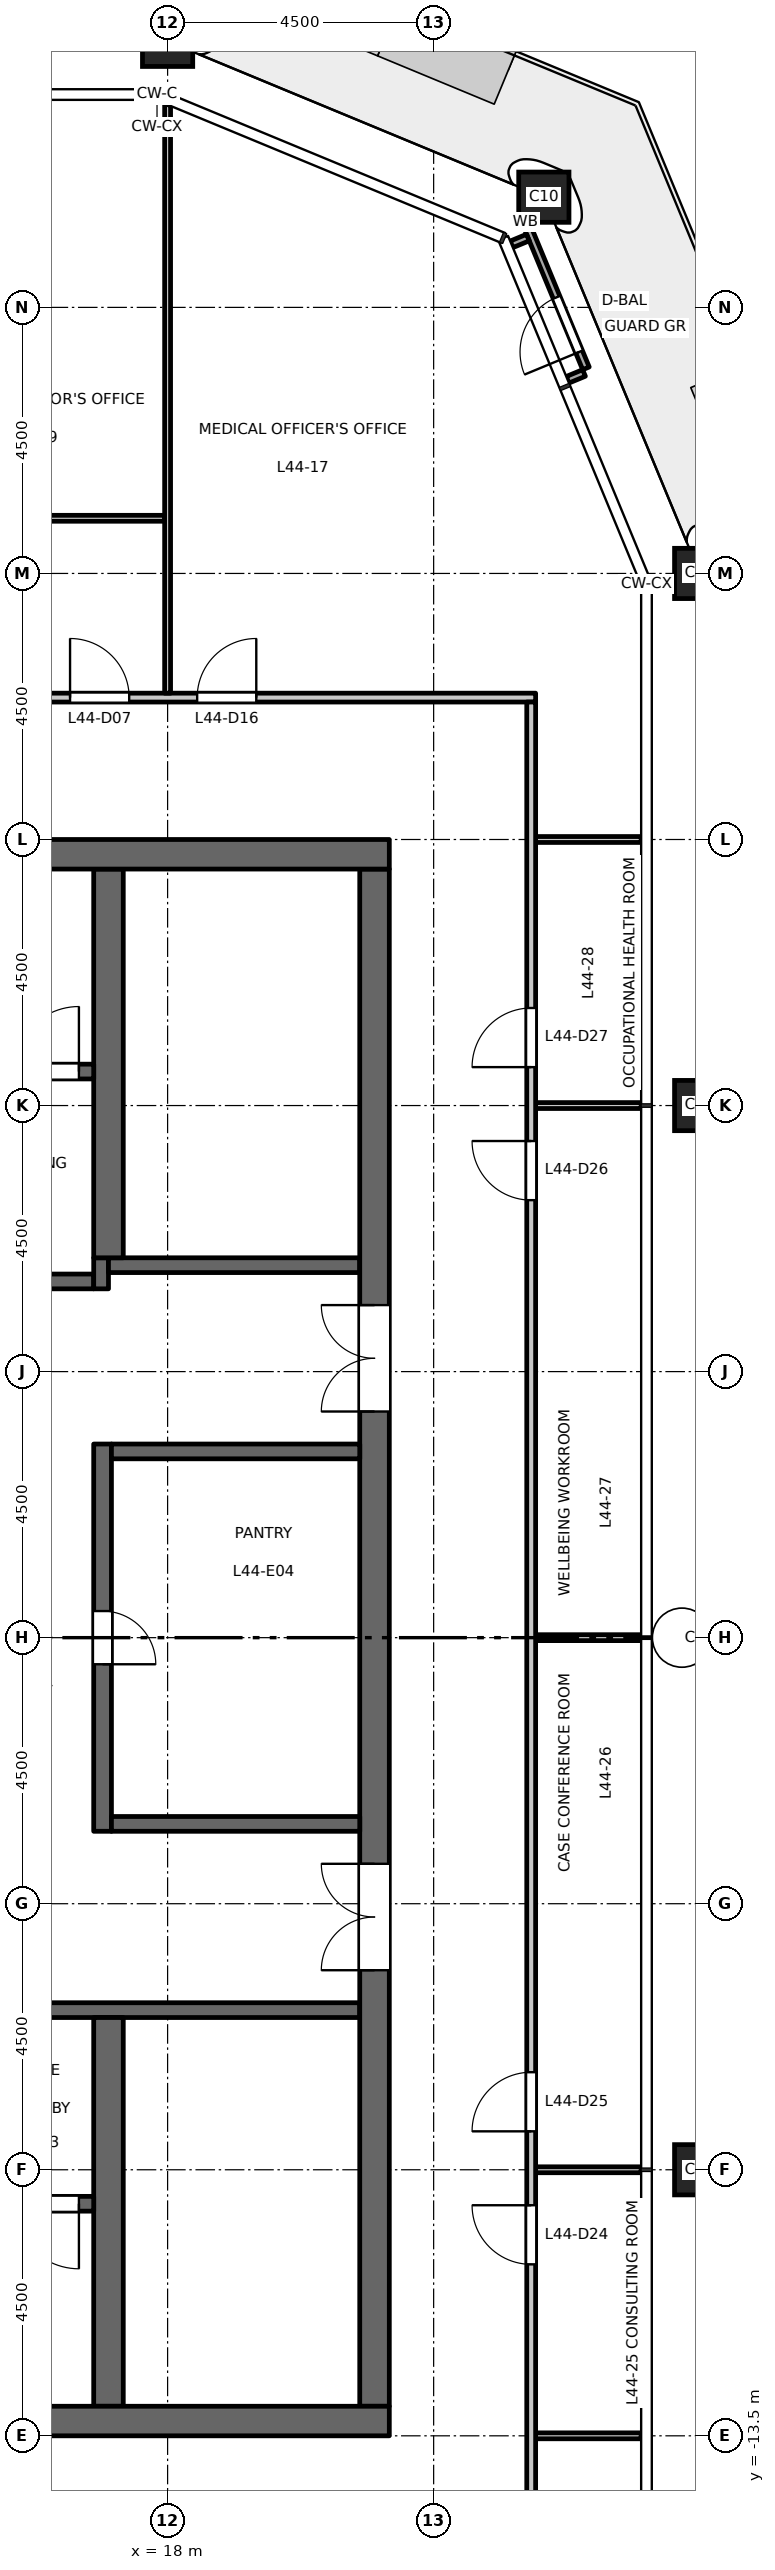
"""IFC4 building model, lengths in metres.
Left out: names, types, materials, properties, quantities, classifications, styles, units other than length and angle.
Written with IfcOpenShell. Run it as: python <this file> out.ifc"""

import sys

from ifc_helpers import new_model, si_unit, direction, frame, frame_2d, origin, origin_2d, place, context, subcontext, project, spatial, rectangle, hollow_rectangle, extrude, element, fill, save


model = new_model("IFC4")
c1 = context("Model", 3, precision=1e-05, world=origin(), true_north=direction((0.0, 1.0)))
c2 = subcontext(c1, "Body", "Model", "MODEL_VIEW")
j1 = project(units=[si_unit("LENGTHUNIT", "METRE"), si_unit("PLANEANGLEUNIT", "RADIAN")], contexts=[c1])
p1 = place(None, origin())
s1 = spatial("IfcSite", under=j1, at=p1, CompositionType="ELEMENT")
p2 = place(p1, origin())
s2 = spatial("IfcBuilding", under=s1, at=p2, CompositionType="ELEMENT")
p3 = place(p2, frame((0.0, 0.0, 206.2)))
s3 = spatial("IfcBuildingStorey", under=s2, at=p3, CompositionType="ELEMENT", Elevation=206.2)
for number, where, z_axis, x_axis in (
    (1, (27.0, -9.0, 0.0), (0.0, 0.0, 1.0), (1.0, 0.0, 0.0)),
    (2, (27.0, 0.0, 0.0), (0.0, 0.0, 1.0), (1.0, 0.0, 0.0)),
    (3, (27.0, 9.0, 0.0), (0.0, 0.0, 1.0), (1.0, 0.0, 0.0)),
    (4, (27.0, 18.0, 0.0), (0.0, 0.0, 1.0), (1.0, 0.0, 0.0)),
    (5, (24.364, 24.364, 0.0), (0.0, 0.0, 1.0), (1.0, 0.0, 0.0)),
    (6, (18.0, 27.0, 0.0), (0.0, 0.0, 1.0), (1.0, 0.0, 0.0)),
):
    element("IfcColumn", number, at=place(p3, frame(where, z_axis=z_axis, x_axis=x_axis)), inside=s3, PredefinedType="COLUMN", context=c2, shape_type="SweptSolid", body=[
        extrude(hollow_rectangle(XDim=0.85, YDim=0.85, WallThickness=0.05, at=origin_2d()), origin(), (0.0, 0.0, 1.0), 4.5),
    ])
p4 = place(p3, frame((12.15, 6.025, 0.0), z_axis=(0.0, 0.0, 1.0), x_axis=(1.0, 0.0, 0.0)))
e7 = element("IfcWall", 7, at=p4, inside=s3, PredefinedType="SHEAR", context=c2, shape_type="SweptSolid", body=[
    extrude(rectangle(XDim=4.6, YDim=0.25, at=frame_2d((2.3, 0.0))), origin(), (0.0, 0.0, 1.0), 4.35),
])
p5 = place(p4, frame((1.8, 0.0, 0.0)))
e8 = element("IfcOpeningElement", 8, at=p5, cuts=e7, PredefinedType="OPENING", context=c2, shape_type="SweptSolid", body=[
    extrude(rectangle(XDim=1.0, YDim=2.1, at=frame_2d((0.5, 1.05))), frame((0.0, 0.135, 0.0), z_axis=(0.0, -1.0, 0.0), x_axis=(1.0, 0.0, 0.0)), (0.0, 0.0, 1.0), 0.27),
])
p6 = place(p3, frame((16.875, 5.9, 0.0), z_axis=(0.0, 0.0, 1.0), x_axis=(0.0, 1.0, 0.0)))
e9 = element("IfcWall", 9, at=p6, inside=s3, PredefinedType="SHEAR", context=c2, shape_type="SweptSolid", body=[
    extrude(rectangle(XDim=0.525, YDim=0.25, at=frame_2d((0.263, 0.0))), origin(), (0.0, 0.0, 1.0), 4.35),
])
p7 = place(p3, frame((17.0, 6.3, 0.0), z_axis=(0.0, 0.0, 1.0), x_axis=(1.0, 0.0, 0.0)))
e10 = element("IfcWall", 10, at=p7, inside=s3, PredefinedType="SHEAR", context=c2, shape_type="SweptSolid", body=[
    extrude(rectangle(XDim=4.25, YDim=0.25, at=frame_2d((2.125, 0.0))), origin(), (0.0, 0.0, 1.0), 4.35),
])
p8 = place(p3, frame((12.15, -6.3, 0.0), z_axis=(0.0, 0.0, 1.0), x_axis=(1.0, 0.0, 0.0)))
e11 = element("IfcWall", 11, at=p8, inside=s3, PredefinedType="SHEAR", context=c2, shape_type="SweptSolid", body=[
    extrude(rectangle(XDim=9.1, YDim=0.25, at=frame_2d((4.55, 0.0))), origin(), (0.0, 0.0, 1.0), 4.35),
])
p9 = place(p8, frame((1.8, 0.0, 0.0)))
e12 = element("IfcOpeningElement", 12, at=p9, cuts=e11, PredefinedType="OPENING", context=c2, shape_type="SweptSolid", body=[
    extrude(rectangle(XDim=1.0, YDim=2.1, at=frame_2d((0.5, 1.05))), frame((0.0, 0.135, 0.0), z_axis=(0.0, -1.0, 0.0), x_axis=(1.0, 0.0, 0.0)), (0.0, 0.0, 1.0), 0.27),
])
p10 = place(p3, frame((21.5, -13.0, 0.0), z_axis=(0.0, 0.0, 1.0), x_axis=(0.0, 1.0, 0.0)))
e13 = element("IfcWall", 13, at=p10, inside=s3, PredefinedType="SHEAR", context=c2, shape_type="SweptSolid", body=[
    extrude(rectangle(XDim=26.0, YDim=0.5, at=frame_2d((13.0, 0.0))), origin(), (0.0, 0.0, 1.0), 4.35),
])
p11 = place(p10, frame((16.825, 0.0, 0.0)))
e14 = element("IfcOpeningElement", 14, at=p11, cuts=e13, PredefinedType="OPENING", context=c2, shape_type="SweptSolid", body=[
    extrude(rectangle(XDim=1.8, YDim=2.1, at=frame_2d((0.9, 1.05))), frame((0.0, 0.26, 0.0), z_axis=(0.0, -1.0, 0.0), x_axis=(1.0, 0.0, 0.0)), (0.0, 0.0, 1.0), 0.52),
])
p12 = place(p10, frame((7.375, 0.0, 0.0)))
e15 = element("IfcOpeningElement", 15, at=p12, cuts=e13, PredefinedType="OPENING", context=c2, shape_type="SweptSolid", body=[
    extrude(rectangle(XDim=1.8, YDim=2.1, at=frame_2d((0.9, 1.05))), frame((0.0, 0.26, 0.0), z_axis=(0.0, -1.0, 0.0), x_axis=(1.0, 0.0, 0.0)), (0.0, 0.0, 1.0), 0.52),
])
p13 = place(p3, frame((16.9, -3.275, 0.0), z_axis=(0.0, 0.0, 1.0), x_axis=(0.0, 1.0, 0.0)))
e16 = element("IfcWall", 16, at=p13, inside=s3, PredefinedType="SHEAR", context=c2, shape_type="SweptSolid", body=[
    extrude(rectangle(XDim=6.55, YDim=0.3, at=frame_2d((3.275, 0.0))), origin(), (0.0, 0.0, 1.0), 4.35),
])
p14 = place(p13, frame((2.825, 0.0, 0.0)))
e17 = element("IfcOpeningElement", 17, at=p14, cuts=e16, PredefinedType="OPENING", context=c2, shape_type="SweptSolid", body=[
    extrude(rectangle(XDim=0.9, YDim=2.1, at=frame_2d((0.45, 1.05))), frame((0.0, 0.16, 0.0), z_axis=(0.0, -1.0, 0.0), x_axis=(1.0, 0.0, 0.0)), (0.0, 0.0, 1.0), 0.32),
])
for number, where, z_axis, x_axis in (
    (18, (17.05, 3.15, 0.0), (0.0, 0.0, 1.0), (1.0, 0.0, 0.0)),
    (19, (17.05, -3.15, 0.0), (0.0, 0.0, 1.0), (1.0, 0.0, 0.0)),
):
    element("IfcWall", number, at=place(p3, frame(where, z_axis=z_axis, x_axis=x_axis)), inside=s3, PredefinedType="SHEAR", context=c2, shape_type="SweptSolid", body=[
        extrude(rectangle(XDim=4.2, YDim=0.25, at=frame_2d((2.1, 0.0))), origin(), (0.0, 0.0, 1.0), 4.35),
    ])
for number, where, z_axis, x_axis in (
    (20, (17.0, 6.425, 0.0), (0.0, 0.0, 1.0), (0.0, 1.0, 0.0)),
    (21, (17.0, -13.0, 0.0), (0.0, 0.0, 1.0), (0.0, 1.0, 0.0)),
):
    element("IfcWall", number, at=place(p3, frame(where, z_axis=z_axis, x_axis=x_axis)), inside=s3, PredefinedType="SHEAR", context=c2, shape_type="SweptSolid", body=[
        extrude(rectangle(XDim=6.575, YDim=0.5, at=frame_2d((3.288, 0.0))), origin(), (0.0, 0.0, 1.0), 4.35),
    ])
p15 = place(p3, frame((8.75, 9.575, 0.0), z_axis=(0.0, 0.0, 1.0), x_axis=(1.0, 0.0, 0.0)))
e22 = element("IfcWall", 22, at=p15, inside=s3, PredefinedType="SHEAR", context=c2, shape_type="SweptSolid", body=[
    extrude(rectangle(XDim=8.0, YDim=0.25, at=frame_2d((4.0, 0.0))), origin(), (0.0, 0.0, 1.0), 4.35),
])
p16 = place(p15, frame((6.65, 0.0, 0.0)))
e23 = element("IfcOpeningElement", 23, at=p16, cuts=e22, PredefinedType="OPENING", context=c2, shape_type="SweptSolid", body=[
    extrude(rectangle(XDim=1.1, YDim=2.1, at=frame_2d((0.55, 1.05))), frame((0.0, 0.135, 0.0), z_axis=(0.0, -1.0, 0.0), x_axis=(1.0, 0.0, 0.0)), (0.0, 0.0, 1.0), 0.27),
])
p17 = place(p3, frame((8.75, -9.575, 0.0), z_axis=(0.0, 0.0, 1.0), x_axis=(1.0, 0.0, 0.0)))
e24 = element("IfcWall", 24, at=p17, inside=s3, PredefinedType="SHEAR", context=c2, shape_type="SweptSolid", body=[
    extrude(rectangle(XDim=8.0, YDim=0.25, at=frame_2d((4.0, 0.0))), origin(), (0.0, 0.0, 1.0), 4.35),
])
p18 = place(p17, frame((6.65, 0.0, 0.0)))
e25 = element("IfcOpeningElement", 25, at=p18, cuts=e24, PredefinedType="OPENING", context=c2, shape_type="SweptSolid", body=[
    extrude(rectangle(XDim=1.1, YDim=2.1, at=frame_2d((0.55, 1.05))), frame((0.0, 0.135, 0.0), z_axis=(0.0, -1.0, 0.0), x_axis=(1.0, 0.0, 0.0)), (0.0, 0.0, 1.0), 0.27),
])
for number, where, z_axis, x_axis in (
    (26, (8.25, 13.25, 0.0), (0.0, 0.0, 1.0), (1.0, 0.0, 0.0)),
    (27, (8.25, -13.25, 0.0), (0.0, 0.0, 1.0), (1.0, 0.0, 0.0)),
):
    element("IfcWall", number, at=place(p3, frame(where, z_axis=z_axis, x_axis=x_axis)), inside=s3, PredefinedType="SHEAR", context=c2, shape_type="SweptSolid", body=[
        extrude(rectangle(XDim=13.5, YDim=0.5, at=frame_2d((6.75, 0.0))), origin(), (0.0, 0.0, 1.0), 4.35),
    ])
p19 = place(p3, frame((24.766, 21.276, 0.0), z_axis=(0.0, 0.0, 1.0), x_axis=(0.923917630863, 0.382591441855, 0.0)))
e28 = element("IfcWall", 28, at=p19, inside=s3, PredefinedType="STANDARD", context=c2, shape_type="SweptSolid", body=[
    extrude(rectangle(XDim=0.3, YDim=0.12, at=frame_2d((0.15, 0.0))), origin(), (0.0, 0.0, 1.0), 4.35),
])
p20 = place(p3, frame((23.818, 23.566, 0.0), z_axis=(0.0, 0.0, 1.0), x_axis=(0.923629715641, 0.383285987724, 0.0)))
e29 = element("IfcWall", 29, at=p20, inside=s3, PredefinedType="STANDARD", context=c2, shape_type="SweptSolid", body=[
    extrude(rectangle(XDim=0.3, YDim=0.12, at=frame_2d((0.15, 0.0))), origin(), (0.0, 0.0, 1.0), 4.35),
])
p21 = place(p3, frame((25.076, 21.469, 0.0), z_axis=(0.0, 0.0, 1.0), x_axis=(-0.382636771556, 0.923898858671, 0.0)))
e30 = element("IfcWall", 30, at=p21, inside=s3, PredefinedType="STANDARD", context=c2, shape_type="SweptSolid", body=[
    extrude(rectangle(XDim=2.673, YDim=0.12, at=frame_2d((1.337, 0.0))), origin(), (0.0, 0.0, 1.0), 4.35),
])
p22 = place(p21, frame((0.3, 0.0, 0.0)))
e31 = element("IfcOpeningElement", 31, at=p22, cuts=e30, PredefinedType="OPENING", context=c2, shape_type="SweptSolid", body=[
    extrude(rectangle(XDim=1.0, YDim=2.4, at=frame_2d((0.5, 1.2))), frame((0.0, 0.07, 0.0), z_axis=(0.0, -1.0, 0.0), x_axis=(1.0, 0.0, 0.0)), (0.0, 0.0, 1.0), 0.14),
])
p23 = place(p3, frame((24.225, -13.5, 0.0), z_axis=(0.0, 0.0, 1.0), x_axis=(1.0, 0.0, 0.0)))
e32 = element("IfcWall", 32, at=p23, inside=s3, PredefinedType="PARTITIONING", context=c2, shape_type="SweptSolid", body=[
    extrude(rectangle(XDim=1.785, YDim=0.1, at=frame_2d((0.893, 0.0))), origin(), (0.0, 0.0, 1.0), 3.95),
])
for number, where, z_axis, x_axis in (
    (33, (24.225, -9.0, 0.0), (0.0, 0.0, 1.0), (1.0, 0.0, 0.0)),
    (34, (24.225, 0.0, 0.0), (0.0, 0.0, 1.0), (1.0, 0.0, 0.0)),
    (35, (24.225, 9.0, 0.0), (0.0, 0.0, 1.0), (1.0, 0.0, 0.0)),
    (36, (24.225, 13.5, 0.0), (0.0, 0.0, 1.0), (1.0, 0.0, 0.0)),
):
    element("IfcWall", number, at=place(p3, frame(where, z_axis=z_axis, x_axis=x_axis)), inside=s3, PredefinedType="PARTITIONING", context=c2, shape_type="SweptSolid", body=[
        extrude(rectangle(XDim=1.785, YDim=0.1, at=frame_2d((0.893, 0.0))), origin(), (0.0, 0.0, 1.0), 4.35),
    ])
p24 = place(p3, frame((-24.225, 15.9, 0.0), z_axis=(0.0, 0.0, 1.0), x_axis=(1.0, 0.0, 0.0)))
e37 = element("IfcWall", 37, at=p24, inside=s3, PredefinedType="PARTITIONING", context=c2, shape_type="SweptSolid", body=[
    extrude(rectangle(XDim=48.45, YDim=0.15, at=frame_2d((24.225, 0.0))), origin(), (0.0, 0.0, 1.0), 4.35),
])
p25 = place(p24, frame((13.575, 0.0, 0.0)))
e38 = element("IfcOpeningElement", 38, at=p25, cuts=e37, PredefinedType="OPENING", context=c2, shape_type="SweptSolid", body=[
    extrude(rectangle(XDim=1.0, YDim=2.1, at=frame_2d((0.5, 1.05))), frame((0.0, 0.085, 0.0), z_axis=(0.0, -1.0, 0.0), x_axis=(1.0, 0.0, 0.0)), (0.0, 0.0, 1.0), 0.17),
])
p26 = place(p24, frame((15.825, 0.0, 0.0)))
e39 = element("IfcOpeningElement", 39, at=p26, cuts=e37, PredefinedType="OPENING", context=c2, shape_type="SweptSolid", body=[
    extrude(rectangle(XDim=1.0, YDim=2.1, at=frame_2d((0.5, 1.05))), frame((0.0, 0.085, 0.0), z_axis=(0.0, -1.0, 0.0), x_axis=(1.0, 0.0, 0.0)), (0.0, 0.0, 1.0), 0.17),
])
p27 = place(p24, frame((31.575, 0.0, 0.0)))
e40 = element("IfcOpeningElement", 40, at=p27, cuts=e37, PredefinedType="OPENING", context=c2, shape_type="SweptSolid", body=[
    extrude(rectangle(XDim=1.0, YDim=2.1, at=frame_2d((0.5, 1.05))), frame((0.0, 0.085, 0.0), z_axis=(0.0, -1.0, 0.0), x_axis=(1.0, 0.0, 0.0)), (0.0, 0.0, 1.0), 0.17),
])
p28 = place(p24, frame((40.575, 0.0, 0.0)))
e41 = element("IfcOpeningElement", 41, at=p28, cuts=e37, PredefinedType="OPENING", context=c2, shape_type="SweptSolid", body=[
    extrude(rectangle(XDim=1.0, YDim=2.1, at=frame_2d((0.5, 1.05))), frame((0.0, 0.085, 0.0), z_axis=(0.0, -1.0, 0.0), x_axis=(1.0, 0.0, 0.0)), (0.0, 0.0, 1.0), 0.17),
])
p29 = place(p24, frame((4.575, 0.0, 0.0)))
e42 = element("IfcOpeningElement", 42, at=p29, cuts=e37, PredefinedType="OPENING", context=c2, shape_type="SweptSolid", body=[
    extrude(rectangle(XDim=1.0, YDim=2.1, at=frame_2d((0.5, 1.05))), frame((0.0, 0.085, 0.0), z_axis=(0.0, -1.0, 0.0), x_axis=(1.0, 0.0, 0.0)), (0.0, 0.0, 1.0), 0.17),
])
p30 = place(p24, frame((42.725, 0.0, 0.0)))
e43 = element("IfcOpeningElement", 43, at=p30, cuts=e37, PredefinedType="OPENING", context=c2, shape_type="SweptSolid", body=[
    extrude(rectangle(XDim=1.0, YDim=2.1, at=frame_2d((0.5, 1.05))), frame((0.0, 0.085, 0.0), z_axis=(0.0, -1.0, 0.0), x_axis=(1.0, 0.0, 0.0)), (0.0, 0.0, 1.0), 0.17),
])
p31 = place(p3, frame((9.05, 18.933, 0.0), z_axis=(0.0, 0.0, 1.0), x_axis=(1.0, 0.0, 0.0)))
e44 = element("IfcWall", 44, at=p31, inside=s3, PredefinedType="PARTITIONING", context=c2, shape_type="SweptSolid", body=[
    extrude(rectangle(XDim=8.9, YDim=0.1, at=frame_2d((4.45, 0.0))), origin(), (0.0, 0.0, 1.0), 4.35),
])
p32 = place(p31, frame((0.55, 0.0, 0.0)))
e45 = element("IfcOpeningElement", 45, at=p32, cuts=e44, PredefinedType="OPENING", context=c2, shape_type="SweptSolid", body=[
    extrude(rectangle(XDim=1.0, YDim=2.1, at=frame_2d((0.5, 1.05))), frame((0.0, 0.06, 0.0), z_axis=(0.0, -1.0, 0.0), x_axis=(1.0, 0.0, 0.0)), (0.0, 0.0, 1.0), 0.12),
])
p33 = place(p3, frame((18.0, 15.975, 0.0), z_axis=(0.0, 0.0, 1.0), x_axis=(0.0, 1.0, 0.0)))
e46 = element("IfcWall", 46, at=p33, inside=s3, PredefinedType="PARTITIONING", context=c2, shape_type="SweptSolid", body=[
    extrude(rectangle(XDim=9.953, YDim=0.1, at=frame_2d((4.977, 0.0))), origin(), (0.0, 0.0, 1.0), 3.65),
])
p34 = place(p3, frame((24.15, -15.825, 0.0), z_axis=(0.0, 0.0, 1.0), x_axis=(0.0, 1.0, 0.0)))
e47 = element("IfcWall", 47, at=p34, inside=s3, PredefinedType="PARTITIONING", context=c2, shape_type="SweptSolid", body=[
    extrude(rectangle(XDim=31.65, YDim=0.15, at=frame_2d((15.825, 0.0))), origin(), (0.0, 0.0, 1.0), 4.35),
])
p35 = place(p34, frame((5.225, 0.0, 0.0)))
e48 = element("IfcOpeningElement", 48, at=p35, cuts=e47, PredefinedType="OPENING", context=c2, shape_type="SweptSolid", body=[
    extrude(rectangle(XDim=1.0, YDim=2.1, at=frame_2d((0.5, 1.05))), frame((0.0, 0.085, 0.0), z_axis=(0.0, -1.0, 0.0), x_axis=(1.0, 0.0, 0.0)), (0.0, 0.0, 1.0), 0.17),
])
p36 = place(p34, frame((7.475, 0.0, 0.0)))
e49 = element("IfcOpeningElement", 49, at=p36, cuts=e47, PredefinedType="OPENING", context=c2, shape_type="SweptSolid", body=[
    extrude(rectangle(XDim=1.0, YDim=2.1, at=frame_2d((0.5, 1.05))), frame((0.0, 0.085, 0.0), z_axis=(0.0, -1.0, 0.0), x_axis=(1.0, 0.0, 0.0)), (0.0, 0.0, 1.0), 0.17),
])
p37 = place(p34, frame((23.225, 0.0, 0.0)))
e50 = element("IfcOpeningElement", 50, at=p37, cuts=e47, PredefinedType="OPENING", context=c2, shape_type="SweptSolid", body=[
    extrude(rectangle(XDim=1.0, YDim=2.1, at=frame_2d((0.5, 1.05))), frame((0.0, 0.085, 0.0), z_axis=(0.0, -1.0, 0.0), x_axis=(1.0, 0.0, 0.0)), (0.0, 0.0, 1.0), 0.17),
])
p38 = place(p34, frame((25.475, 0.0, 0.0)))
e51 = element("IfcOpeningElement", 51, at=p38, cuts=e47, PredefinedType="OPENING", context=c2, shape_type="SweptSolid", body=[
    extrude(rectangle(XDim=1.0, YDim=2.1, at=frame_2d((0.5, 1.05))), frame((0.0, 0.085, 0.0), z_axis=(0.0, -1.0, 0.0), x_axis=(1.0, 0.0, 0.0)), (0.0, 0.0, 1.0), 0.17),
])
p39 = place(p16, origin())
e52 = element("IfcDoor", 52, at=p39, inside=s3, OperationType="SINGLE_SWING_LEFT", PredefinedType="DOOR", context=c2, shape_type="SweptSolid", body=[
    extrude(rectangle(XDim=1.1, YDim=2.1, at=frame_2d((0.55, 1.05))), frame((0.0, 0.025, 0.0), z_axis=(0.0, -1.0, 0.0), x_axis=(1.0, 0.0, 0.0)), (0.0, 0.0, 1.0), 0.05),
])
fill(e23, e52)
p40 = place(p18, origin())
e53 = element("IfcDoor", 53, at=p40, inside=s3, OperationType="SINGLE_SWING_RIGHT", PredefinedType="DOOR", context=c2, shape_type="SweptSolid", body=[
    extrude(rectangle(XDim=1.1, YDim=2.1, at=frame_2d((0.55, 1.05))), frame((0.0, 0.025, 0.0), z_axis=(0.0, -1.0, 0.0), x_axis=(1.0, 0.0, 0.0)), (0.0, 0.0, 1.0), 0.05),
])
fill(e25, e53)
p41 = place(p11, origin())
e54 = element("IfcDoor", 54, at=p41, inside=s3, OperationType="DOUBLE_DOOR_DOUBLE_SWING", PredefinedType="DOOR", context=c2, shape_type="SweptSolid", body=[
    extrude(rectangle(XDim=1.8, YDim=2.1, at=frame_2d((0.9, 1.05))), frame((0.0, 0.025, 0.0), z_axis=(0.0, -1.0, 0.0), x_axis=(1.0, 0.0, 0.0)), (0.0, 0.0, 1.0), 0.05),
])
fill(e14, e54)
p42 = place(p12, origin())
e55 = element("IfcDoor", 55, at=p42, inside=s3, OperationType="DOUBLE_DOOR_DOUBLE_SWING", PredefinedType="DOOR", context=c2, shape_type="SweptSolid", body=[
    extrude(rectangle(XDim=1.8, YDim=2.1, at=frame_2d((0.9, 1.05))), frame((0.0, 0.025, 0.0), z_axis=(0.0, -1.0, 0.0), x_axis=(1.0, 0.0, 0.0)), (0.0, 0.0, 1.0), 0.05),
])
fill(e15, e55)
p43 = place(p14, origin())
e56 = element("IfcDoor", 56, at=p43, inside=s3, OperationType="SINGLE_SWING_LEFT", PredefinedType="DOOR", context=c2, shape_type="SweptSolid", body=[
    extrude(rectangle(XDim=0.9, YDim=2.1, at=frame_2d((0.45, 1.05))), frame((0.0, 0.025, 0.0), z_axis=(0.0, -1.0, 0.0), x_axis=(1.0, 0.0, 0.0)), (0.0, 0.0, 1.0), 0.05),
])
fill(e17, e56)
p44 = place(p22, origin())
e57 = element("IfcDoor", 57, at=p44, inside=s3, OperationType="SINGLE_SWING_LEFT", PredefinedType="DOOR", context=c2, shape_type="SweptSolid", body=[
    extrude(rectangle(XDim=1.0, YDim=2.4, at=frame_2d((0.5, 1.2))), frame((0.0, 0.025, 0.0), z_axis=(0.0, -1.0, 0.0), x_axis=(1.0, 0.0, 0.0)), (0.0, 0.0, 1.0), 0.05),
])
fill(e31, e57)
p45 = place(p28, origin())
e58 = element("IfcDoor", 58, at=p45, inside=s3, OperationType="SINGLE_SWING_LEFT", PredefinedType="DOOR", context=c2, shape_type="SweptSolid", body=[
    extrude(rectangle(XDim=1.0, YDim=2.1, at=frame_2d((0.5, 1.05))), frame((0.0, 0.025, 0.0), z_axis=(0.0, -1.0, 0.0), x_axis=(1.0, 0.0, 0.0)), (0.0, 0.0, 1.0), 0.05),
])
fill(e41, e58)
p46 = place(p30, origin())
e59 = element("IfcDoor", 59, at=p46, inside=s3, OperationType="SINGLE_SWING_RIGHT", PredefinedType="DOOR", context=c2, shape_type="SweptSolid", body=[
    extrude(rectangle(XDim=1.0, YDim=2.1, at=frame_2d((0.5, 1.05))), frame((0.0, 0.025, 0.0), z_axis=(0.0, -1.0, 0.0), x_axis=(1.0, 0.0, 0.0)), (0.0, 0.0, 1.0), 0.05),
])
fill(e43, e59)
p47 = place(p35, origin())
e60 = element("IfcDoor", 60, at=p47, inside=s3, OperationType="SINGLE_SWING_RIGHT", PredefinedType="DOOR", context=c2, shape_type="SweptSolid", body=[
    extrude(rectangle(XDim=1.0, YDim=2.1, at=frame_2d((0.5, 1.05))), frame((0.0, 0.025, 0.0), z_axis=(0.0, -1.0, 0.0), x_axis=(1.0, 0.0, 0.0)), (0.0, 0.0, 1.0), 0.05),
])
fill(e48, e60)
p48 = place(p36, origin())
e61 = element("IfcDoor", 61, at=p48, inside=s3, OperationType="SINGLE_SWING_LEFT", PredefinedType="DOOR", context=c2, shape_type="SweptSolid", body=[
    extrude(rectangle(XDim=1.0, YDim=2.1, at=frame_2d((0.5, 1.05))), frame((0.0, 0.025, 0.0), z_axis=(0.0, -1.0, 0.0), x_axis=(1.0, 0.0, 0.0)), (0.0, 0.0, 1.0), 0.05),
])
fill(e49, e61)
p49 = place(p37, origin())
e62 = element("IfcDoor", 62, at=p49, inside=s3, OperationType="SINGLE_SWING_RIGHT", PredefinedType="DOOR", context=c2, shape_type="SweptSolid", body=[
    extrude(rectangle(XDim=1.0, YDim=2.1, at=frame_2d((0.5, 1.05))), frame((0.0, 0.025, 0.0), z_axis=(0.0, -1.0, 0.0), x_axis=(1.0, 0.0, 0.0)), (0.0, 0.0, 1.0), 0.05),
])
fill(e50, e62)
p50 = place(p38, origin())
e63 = element("IfcDoor", 63, at=p50, inside=s3, OperationType="SINGLE_SWING_LEFT", PredefinedType="DOOR", context=c2, shape_type="SweptSolid", body=[
    extrude(rectangle(XDim=1.0, YDim=2.1, at=frame_2d((0.5, 1.05))), frame((0.0, 0.025, 0.0), z_axis=(0.0, -1.0, 0.0), x_axis=(1.0, 0.0, 0.0)), (0.0, 0.0, 1.0), 0.05),
])
fill(e51, e63)
save(model, sys.argv[1])
